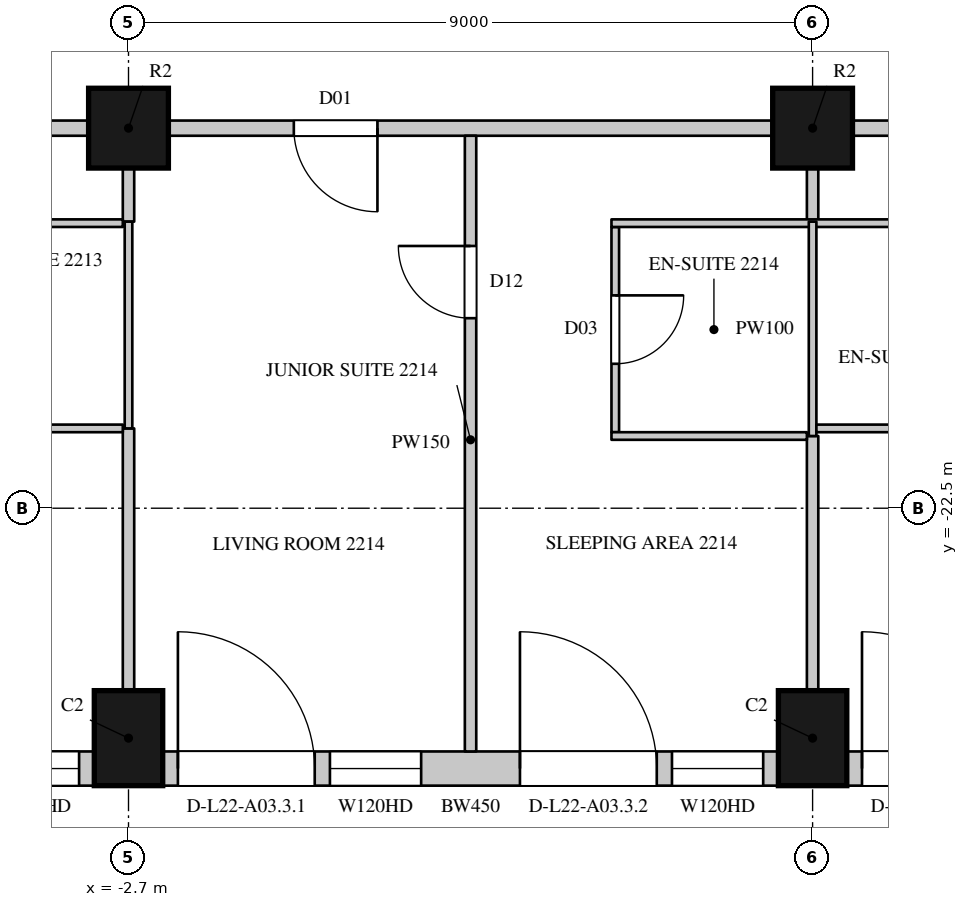
"""IFC4 building model, lengths in metres.
Left out: names, types, materials, properties, quantities, classifications, styles, units other than length and angle.
Written with IfcOpenShell. Run it as: python <this file> out.ifc"""

import sys

from ifc_helpers import new_model, si_unit, direction, frame, frame_2d, origin, origin_2d, place, context, subcontext, project, spatial, rectangle, circle, extrude, element, fill, save


model = new_model("IFC4")
c1 = context("Model", 3, precision=1e-05, world=origin(), true_north=direction((0.0, 1.0)))
c2 = subcontext(c1, "Body", "Model", "MODEL_VIEW")
j1 = project(units=[si_unit("LENGTHUNIT", "METRE"), si_unit("PLANEANGLEUNIT", "RADIAN")], contexts=[c1])
p1 = place(None, origin())
s1 = spatial("IfcSite", under=j1, at=p1, CompositionType="ELEMENT")
p2 = place(p1, origin())
s2 = spatial("IfcBuilding", under=s1, at=p2, CompositionType="ELEMENT")
p3 = place(p2, frame((0.0, 0.0, 109.5)))
s3 = spatial("IfcBuildingStorey", under=s2, at=p3, CompositionType="ELEMENT", Elevation=109.5)
for number, where, z_axis, x_axis in (
    (1, (-2.7, -25.525, 0.0), (0.0, 0.0, 1.0), (1.0, 0.0, 0.0)),
    (2, (6.3, -25.525, 0.0), (0.0, 0.0, 1.0), (1.0, 0.0, 0.0)),
):
    element("IfcColumn", number, at=place(p3, frame(where, z_axis=z_axis, x_axis=x_axis)), inside=s3, PredefinedType="COLUMN", context=c2, shape_type="SweptSolid", body=[
        extrude(rectangle(XDim=0.9, YDim=1.25, at=origin_2d()), origin(), (0.0, 0.0, 1.0), 3.6),
    ])
for number, where, z_axis, x_axis in (
    (3, (-2.7, -17.5, 0.0), (0.0, 0.0, 1.0), (1.0, 0.0, 0.0)),
    (4, (6.3, -17.5, 0.0), (0.0, 0.0, 1.0), (1.0, 0.0, 0.0)),
):
    element("IfcColumn", number, at=place(p3, frame(where, z_axis=z_axis, x_axis=x_axis)), inside=s3, PredefinedType="COLUMN", context=c2, shape_type="SweptSolid", body=[
        extrude(circle(Radius=0.525, at=origin_2d()), origin(), (0.0, 0.0, 1.0), 3.6),
    ])
p4 = place(p3, frame((-11.25, -25.925, 0.0), z_axis=(0.0, 0.0, 1.0), x_axis=(1.0, 0.0, 0.0)))
e5 = element("IfcWall", 5, at=p4, inside=s3, PredefinedType="SOLIDWALL", context=c2, shape_type="SweptSolid", body=[
    extrude(rectangle(XDim=8.1, YDim=0.45, at=frame_2d((4.05, 0.0))), origin(), (0.0, 0.0, 1.0), 3.3),
])
p5 = place(p4, frame((0.2, 0.0, 0.0)))
e6 = element("IfcOpeningElement", 6, at=p5, cuts=e5, PredefinedType="OPENING", context=c2, shape_type="SweptSolid", body=[
    extrude(rectangle(XDim=1.8, YDim=2.4, at=frame_2d((0.9, 1.2))), frame((0.0, 0.235, 0.0), z_axis=(0.0, -1.0, 0.0), x_axis=(1.0, 0.0, 0.0)), (0.0, 0.0, 1.0), 0.47),
])
p6 = place(p4, frame((2.2, 0.0, 1.05)))
e7 = element("IfcOpeningElement", 7, at=p6, cuts=e5, PredefinedType="OPENING", context=c2, shape_type="SweptSolid", body=[
    extrude(rectangle(XDim=1.2, YDim=2.0, at=frame_2d((0.6, 1.0))), frame((0.0, 0.235, 0.0), z_axis=(0.0, -1.0, 0.0), x_axis=(1.0, 0.0, 0.0)), (0.0, 0.0, 1.0), 0.47),
])
p7 = place(p4, frame((4.7, 0.0, 0.0)))
e8 = element("IfcOpeningElement", 8, at=p7, cuts=e5, PredefinedType="OPENING", context=c2, shape_type="SweptSolid", body=[
    extrude(rectangle(XDim=1.8, YDim=2.4, at=frame_2d((0.9, 1.2))), frame((0.0, 0.235, 0.0), z_axis=(0.0, -1.0, 0.0), x_axis=(1.0, 0.0, 0.0)), (0.0, 0.0, 1.0), 0.47),
])
p8 = place(p4, frame((6.7, 0.0, 1.05)))
e9 = element("IfcOpeningElement", 9, at=p8, cuts=e5, PredefinedType="OPENING", context=c2, shape_type="SweptSolid", body=[
    extrude(rectangle(XDim=1.2, YDim=2.0, at=frame_2d((0.6, 1.0))), frame((0.0, 0.235, 0.0), z_axis=(0.0, -1.0, 0.0), x_axis=(1.0, 0.0, 0.0)), (0.0, 0.0, 1.0), 0.47),
])
p9 = place(p3, frame((-2.25, -25.925, 0.0), z_axis=(0.0, 0.0, 1.0), x_axis=(1.0, 0.0, 0.0)))
e10 = element("IfcWall", 10, at=p9, inside=s3, PredefinedType="SOLIDWALL", context=c2, shape_type="SweptSolid", body=[
    extrude(rectangle(XDim=8.1, YDim=0.45, at=frame_2d((4.05, 0.0))), origin(), (0.0, 0.0, 1.0), 3.3),
])
p10 = place(p9, frame((0.2, 0.0, 0.0)))
e11 = element("IfcOpeningElement", 11, at=p10, cuts=e10, PredefinedType="OPENING", context=c2, shape_type="SweptSolid", body=[
    extrude(rectangle(XDim=1.8, YDim=2.4, at=frame_2d((0.9, 1.2))), frame((0.0, 0.235, 0.0), z_axis=(0.0, -1.0, 0.0), x_axis=(1.0, 0.0, 0.0)), (0.0, 0.0, 1.0), 0.47),
])
p11 = place(p9, frame((2.2, 0.0, 1.05)))
e12 = element("IfcOpeningElement", 12, at=p11, cuts=e10, PredefinedType="OPENING", context=c2, shape_type="SweptSolid", body=[
    extrude(rectangle(XDim=1.2, YDim=2.0, at=frame_2d((0.6, 1.0))), frame((0.0, 0.235, 0.0), z_axis=(0.0, -1.0, 0.0), x_axis=(1.0, 0.0, 0.0)), (0.0, 0.0, 1.0), 0.47),
])
p12 = place(p9, frame((4.7, 0.0, 0.0)))
e13 = element("IfcOpeningElement", 13, at=p12, cuts=e10, PredefinedType="OPENING", context=c2, shape_type="SweptSolid", body=[
    extrude(rectangle(XDim=1.8, YDim=2.4, at=frame_2d((0.9, 1.2))), frame((0.0, 0.235, 0.0), z_axis=(0.0, -1.0, 0.0), x_axis=(1.0, 0.0, 0.0)), (0.0, 0.0, 1.0), 0.47),
])
p13 = place(p9, frame((6.7, 0.0, 1.05)))
e14 = element("IfcOpeningElement", 14, at=p13, cuts=e10, PredefinedType="OPENING", context=c2, shape_type="SweptSolid", body=[
    extrude(rectangle(XDim=1.2, YDim=2.0, at=frame_2d((0.6, 1.0))), frame((0.0, 0.235, 0.0), z_axis=(0.0, -1.0, 0.0), x_axis=(1.0, 0.0, 0.0)), (0.0, 0.0, 1.0), 0.47),
])
p14 = place(p3, frame((6.75, -25.925, 0.0), z_axis=(0.0, 0.0, 1.0), x_axis=(1.0, 0.0, 0.0)))
e15 = element("IfcWall", 15, at=p14, inside=s3, PredefinedType="SOLIDWALL", context=c2, shape_type="SweptSolid", body=[
    extrude(rectangle(XDim=8.1, YDim=0.45, at=frame_2d((4.05, 0.0))), origin(), (0.0, 0.0, 1.0), 3.3),
])
p15 = place(p14, frame((0.2, 0.0, 0.0)))
e16 = element("IfcOpeningElement", 16, at=p15, cuts=e15, PredefinedType="OPENING", context=c2, shape_type="SweptSolid", body=[
    extrude(rectangle(XDim=1.8, YDim=2.4, at=frame_2d((0.9, 1.2))), frame((0.0, 0.235, 0.0), z_axis=(0.0, -1.0, 0.0), x_axis=(1.0, 0.0, 0.0)), (0.0, 0.0, 1.0), 0.47),
])
p16 = place(p14, frame((2.2, 0.0, 1.05)))
e17 = element("IfcOpeningElement", 17, at=p16, cuts=e15, PredefinedType="OPENING", context=c2, shape_type="SweptSolid", body=[
    extrude(rectangle(XDim=1.2, YDim=2.0, at=frame_2d((0.6, 1.0))), frame((0.0, 0.235, 0.0), z_axis=(0.0, -1.0, 0.0), x_axis=(1.0, 0.0, 0.0)), (0.0, 0.0, 1.0), 0.47),
])
p17 = place(p14, frame((5.4, 0.0, 0.0)))
e18 = element("IfcOpeningElement", 18, at=p17, cuts=e15, PredefinedType="OPENING", context=c2, shape_type="SweptSolid", body=[
    extrude(rectangle(XDim=1.8, YDim=2.4, at=frame_2d((0.9, 1.2))), frame((0.0, 0.235, 0.0), z_axis=(0.0, -1.0, 0.0), x_axis=(1.0, 0.0, 0.0)), (0.0, 0.0, 1.0), 0.47),
])
p18 = place(p3, frame((-11.175, -17.5, 0.0), z_axis=(0.0, 0.0, 1.0), x_axis=(1.0, 0.0, 0.0)))
e19 = element("IfcWall", 19, at=p18, inside=s3, PredefinedType="PARTITIONING", context=c2, shape_type="SweptSolid", body=[
    extrude(rectangle(XDim=7.95, YDim=0.2, at=frame_2d((3.975, 0.0))), origin(), (0.0, 0.0, 1.0), 2.75),
])
p19 = place(p18, frame((4.55, 0.0, 0.0)))
e20 = element("IfcOpeningElement", 20, at=p19, cuts=e19, PredefinedType="OPENING", context=c2, shape_type="SweptSolid", body=[
    extrude(rectangle(XDim=0.95, YDim=2.2, at=frame_2d((0.475, 1.1))), frame((0.0, 0.11, 0.0), z_axis=(0.0, -1.0, 0.0), x_axis=(1.0, 0.0, 0.0)), (0.0, 0.0, 1.0), 0.22),
])
p20 = place(p3, frame((-2.175, -17.5, 0.0), z_axis=(0.0, 0.0, 1.0), x_axis=(1.0, 0.0, 0.0)))
e21 = element("IfcWall", 21, at=p20, inside=s3, PredefinedType="PARTITIONING", context=c2, shape_type="SweptSolid", body=[
    extrude(rectangle(XDim=7.95, YDim=0.2, at=frame_2d((3.975, 0.0))), origin(), (0.0, 0.0, 1.0), 2.75),
])
p21 = place(p20, frame((1.65, 0.0, 0.0)))
e22 = element("IfcOpeningElement", 22, at=p21, cuts=e21, PredefinedType="OPENING", context=c2, shape_type="SweptSolid", body=[
    extrude(rectangle(XDim=1.1, YDim=2.4, at=frame_2d((0.55, 1.2))), frame((0.0, 0.11, 0.0), z_axis=(0.0, -1.0, 0.0), x_axis=(1.0, 0.0, 0.0)), (0.0, 0.0, 1.0), 0.22),
])
p22 = place(p3, frame((6.825, -17.5, 0.0), z_axis=(0.0, 0.0, 1.0), x_axis=(1.0, 0.0, 0.0)))
e23 = element("IfcWall", 23, at=p22, inside=s3, PredefinedType="PARTITIONING", context=c2, shape_type="SweptSolid", body=[
    extrude(rectangle(XDim=7.95, YDim=0.2, at=frame_2d((3.975, 0.0))), origin(), (0.0, 0.0, 1.0), 2.75),
])
p23 = place(p22, frame((2.45, 0.0, 0.0)))
e24 = element("IfcOpeningElement", 24, at=p23, cuts=e23, PredefinedType="OPENING", context=c2, shape_type="SweptSolid", body=[
    extrude(rectangle(XDim=0.95, YDim=2.2, at=frame_2d((0.475, 1.1))), frame((0.0, 0.11, 0.0), z_axis=(0.0, -1.0, 0.0), x_axis=(1.0, 0.0, 0.0)), (0.0, 0.0, 1.0), 0.22),
])
p24 = place(p22, frame((4.95, 0.0, 0.0)))
e25 = element("IfcOpeningElement", 25, at=p24, cuts=e23, PredefinedType="OPENING", context=c2, shape_type="SweptSolid", body=[
    extrude(rectangle(XDim=0.95, YDim=2.2, at=frame_2d((0.475, 1.1))), frame((0.0, 0.11, 0.0), z_axis=(0.0, -1.0, 0.0), x_axis=(1.0, 0.0, 0.0)), (0.0, 0.0, 1.0), 0.22),
])
p25 = place(p3, frame((-2.7, -24.9, 0.0), z_axis=(0.0, 0.0, 1.0), x_axis=(0.0, 1.0, 0.0)))
e26 = element("IfcWall", 26, at=p25, inside=s3, PredefinedType="PARTITIONING", context=c2, shape_type="SweptSolid", body=[
    extrude(rectangle(XDim=3.45, YDim=0.15, at=frame_2d((1.725, 0.0))), origin(), (0.0, 0.0, 1.0), 2.75),
])
p26 = place(p3, frame((-2.7, -18.73, 0.0), z_axis=(0.0, 0.0, 1.0), x_axis=(0.0, 1.0, 0.0)))
e27 = element("IfcWall", 27, at=p26, inside=s3, PredefinedType="PARTITIONING", context=c2, shape_type="SweptSolid", body=[
    extrude(rectangle(XDim=0.705, YDim=0.15, at=frame_2d((0.353, 0.0))), origin(), (0.0, 0.0, 1.0), 2.75),
])
p27 = place(p3, frame((1.8, -25.7, 0.0), z_axis=(0.0, 0.0, 1.0), x_axis=(0.0, 1.0, 0.0)))
e28 = element("IfcWall", 28, at=p27, inside=s3, PredefinedType="PARTITIONING", context=c2, shape_type="SweptSolid", body=[
    extrude(rectangle(XDim=8.1, YDim=0.15, at=frame_2d((4.05, 0.0))), origin(), (0.0, 0.0, 1.0), 2.65),
])
p28 = place(p27, frame((5.7, 0.0, 0.0)))
e29 = element("IfcOpeningElement", 29, at=p28, cuts=e28, PredefinedType="OPENING", context=c2, shape_type="SweptSolid", body=[
    extrude(rectangle(XDim=0.95, YDim=2.2, at=frame_2d((0.475, 1.1))), frame((0.0, 0.085, 0.0), z_axis=(0.0, -1.0, 0.0), x_axis=(1.0, 0.0, 0.0)), (0.0, 0.0, 1.0), 0.17),
])
p29 = place(p3, frame((6.3, -24.9, 0.0), z_axis=(0.0, 0.0, 1.0), x_axis=(0.0, 1.0, 0.0)))
e30 = element("IfcWall", 30, at=p29, inside=s3, PredefinedType="PARTITIONING", context=c2, shape_type="SweptSolid", body=[
    extrude(rectangle(XDim=3.35, YDim=0.15, at=frame_2d((1.675, 0.0))), origin(), (0.0, 0.0, 1.0), 2.75),
])
p30 = place(p3, frame((6.3, -18.73, 0.0), z_axis=(0.0, 0.0, 1.0), x_axis=(0.0, 1.0, 0.0)))
e31 = element("IfcWall", 31, at=p30, inside=s3, PredefinedType="PARTITIONING", context=c2, shape_type="SweptSolid", body=[
    extrude(rectangle(XDim=0.705, YDim=0.15, at=frame_2d((0.353, 0.0))), origin(), (0.0, 0.0, 1.0), 2.75),
])
for number, where, z_axis, x_axis in (
    (32, (-5.146, -21.45, 0.0), (0.0, 0.0, 1.0), (1.0, 0.0, 0.0)),
    (33, (-5.146, -18.75, 0.0), (0.0, 0.0, 1.0), (1.0, 0.0, 0.0)),
):
    element("IfcWall", number, at=place(p3, frame(where, z_axis=z_axis, x_axis=x_axis)), inside=s3, PredefinedType="PARTITIONING", context=c2, shape_type="SweptSolid", body=[
        extrude(rectangle(XDim=2.371, YDim=0.1, at=frame_2d((1.186, 0.0))), origin(), (0.0, 0.0, 1.0), 3.3),
    ])
p31 = place(p3, frame((-2.7, -21.45, 0.0), z_axis=(0.0, 0.0, 1.0), x_axis=(0.0, 1.0, 0.0)))
e34 = element("IfcWall", 34, at=p31, inside=s3, PredefinedType="PARTITIONING", context=c2, shape_type="SweptSolid", body=[
    extrude(rectangle(XDim=2.72, YDim=0.1, at=frame_2d((1.36, 0.0))), origin(), (0.0, 0.0, 1.0), 2.75),
])
p32 = place(p3, frame((3.704, -21.5, 0.0), z_axis=(0.0, 0.0, 1.0), x_axis=(0.0, 1.0, 0.0)))
e35 = element("IfcWall", 35, at=p32, inside=s3, PredefinedType="PARTITIONING", context=c2, shape_type="SweptSolid", body=[
    extrude(rectangle(XDim=2.7, YDim=0.1, at=frame_2d((1.35, 0.0))), origin(), (0.0, 0.0, 1.0), 3.3),
])
p33 = place(p32, frame((0.9, 0.0, 0.0)))
e36 = element("IfcOpeningElement", 36, at=p33, cuts=e35, PredefinedType="OPENING", context=c2, shape_type="SweptSolid", body=[
    extrude(rectangle(XDim=0.9, YDim=2.2, at=frame_2d((0.45, 1.1))), frame((0.0, 0.06, 0.0), z_axis=(0.0, -1.0, 0.0), x_axis=(1.0, 0.0, 0.0)), (0.0, 0.0, 1.0), 0.12),
])
p34 = place(p3, frame((3.654, -21.55, 0.0), z_axis=(0.0, 0.0, 1.0), x_axis=(1.0, 0.0, 0.0)))
e37 = element("IfcWall", 37, at=p34, inside=s3, PredefinedType="PARTITIONING", context=c2, shape_type="SweptSolid", body=[
    extrude(rectangle(XDim=2.571, YDim=0.1, at=frame_2d((1.286, 0.0))), origin(), (0.0, 0.0, 1.0), 3.3),
])
p35 = place(p3, frame((3.654, -18.75, 0.0), z_axis=(0.0, 0.0, 1.0), x_axis=(1.0, 0.0, 0.0)))
e38 = element("IfcWall", 38, at=p35, inside=s3, PredefinedType="PARTITIONING", context=c2, shape_type="SweptSolid", body=[
    extrude(rectangle(XDim=5.092, YDim=0.1, at=frame_2d((2.546, 0.0))), origin(), (0.0, 0.0, 1.0), 3.3),
])
p36 = place(p35, frame((3.95, 0.0, 0.0)))
e39 = element("IfcOpeningElement", 39, at=p36, cuts=e38, PredefinedType="OPENING", context=c2, shape_type="SweptSolid", body=[
    extrude(rectangle(XDim=0.9, YDim=2.2, at=frame_2d((0.45, 1.1))), frame((0.0, 0.06, 0.0), z_axis=(0.0, -1.0, 0.0), x_axis=(1.0, 0.0, 0.0)), (0.0, 0.0, 1.0), 0.12),
])
p37 = place(p3, frame((6.3, -21.55, 0.0), z_axis=(0.0, 0.0, 1.0), x_axis=(0.0, 1.0, 0.0)))
e40 = element("IfcWall", 40, at=p37, inside=s3, PredefinedType="PARTITIONING", context=c2, shape_type="SweptSolid", body=[
    extrude(rectangle(XDim=2.82, YDim=0.1, at=frame_2d((1.41, 0.0))), origin(), (0.0, 0.0, 1.0), 2.75),
])
p38 = place(p3, frame((6.35, -21.45, 0.0), z_axis=(0.0, 0.0, 1.0), x_axis=(1.0, 0.0, 0.0)))
e41 = element("IfcWall", 41, at=p38, inside=s3, PredefinedType="PARTITIONING", context=c2, shape_type="SweptSolid", body=[
    extrude(rectangle(XDim=2.396, YDim=0.1, at=frame_2d((1.198, 0.0))), origin(), (0.0, 0.0, 1.0), 3.3),
])
p39 = place(p8, origin())
e42 = element("IfcWindow", 42, at=p39, inside=s3, PartitioningType="SINGLE_PANEL", PredefinedType="WINDOW", context=c2, shape_type="SweptSolid", body=[
    extrude(rectangle(XDim=1.2, YDim=2.0, at=frame_2d((0.6, 1.0))), frame((0.0, 0.135, 0.0), z_axis=(0.0, -1.0, 0.0), x_axis=(1.0, 0.0, 0.0)), (0.0, 0.0, 1.0), 0.06),
])
fill(e9, e42)
p40 = place(p10, origin())
e43 = element("IfcDoor", 43, at=p40, inside=s3, OperationType="SLIDING_TO_LEFT", PredefinedType="DOOR", context=c2, shape_type="SweptSolid", body=[
    extrude(rectangle(XDim=1.8, YDim=2.4, at=frame_2d((0.9, 1.2))), frame((0.0, 0.13, 0.0), z_axis=(0.0, -1.0, 0.0), x_axis=(1.0, 0.0, 0.0)), (0.0, 0.0, 1.0), 0.05),
])
fill(e11, e43)
p41 = place(p11, origin())
e44 = element("IfcWindow", 44, at=p41, inside=s3, PartitioningType="SINGLE_PANEL", PredefinedType="WINDOW", context=c2, shape_type="SweptSolid", body=[
    extrude(rectangle(XDim=1.2, YDim=2.0, at=frame_2d((0.6, 1.0))), frame((0.0, 0.135, 0.0), z_axis=(0.0, -1.0, 0.0), x_axis=(1.0, 0.0, 0.0)), (0.0, 0.0, 1.0), 0.06),
])
fill(e12, e44)
p42 = place(p12, origin())
e45 = element("IfcDoor", 45, at=p42, inside=s3, OperationType="SLIDING_TO_LEFT", PredefinedType="DOOR", context=c2, shape_type="SweptSolid", body=[
    extrude(rectangle(XDim=1.8, YDim=2.4, at=frame_2d((0.9, 1.2))), frame((0.0, 0.13, 0.0), z_axis=(0.0, -1.0, 0.0), x_axis=(1.0, 0.0, 0.0)), (0.0, 0.0, 1.0), 0.05),
])
fill(e13, e45)
p43 = place(p13, origin())
e46 = element("IfcWindow", 46, at=p43, inside=s3, PartitioningType="SINGLE_PANEL", PredefinedType="WINDOW", context=c2, shape_type="SweptSolid", body=[
    extrude(rectangle(XDim=1.2, YDim=2.0, at=frame_2d((0.6, 1.0))), frame((0.0, 0.135, 0.0), z_axis=(0.0, -1.0, 0.0), x_axis=(1.0, 0.0, 0.0)), (0.0, 0.0, 1.0), 0.06),
])
fill(e14, e46)
p44 = place(p15, origin())
e47 = element("IfcDoor", 47, at=p44, inside=s3, OperationType="SLIDING_TO_LEFT", PredefinedType="DOOR", context=c2, shape_type="SweptSolid", body=[
    extrude(rectangle(XDim=1.8, YDim=2.4, at=frame_2d((0.9, 1.2))), frame((0.0, 0.13, 0.0), z_axis=(0.0, -1.0, 0.0), x_axis=(1.0, 0.0, 0.0)), (0.0, 0.0, 1.0), 0.05),
])
fill(e16, e47)
p45 = place(p21, origin())
e48 = element("IfcDoor", 48, at=p45, inside=s3, OperationType="SINGLE_SWING_LEFT", PredefinedType="DOOR", context=c2, shape_type="SweptSolid", body=[
    extrude(rectangle(XDim=1.1, YDim=2.4, at=frame_2d((0.55, 1.2))), frame((0.0, 0.025, 0.0), z_axis=(0.0, -1.0, 0.0), x_axis=(1.0, 0.0, 0.0)), (0.0, 0.0, 1.0), 0.05),
])
fill(e22, e48)
p46 = place(p28, origin())
e49 = element("IfcDoor", 49, at=p46, inside=s3, OperationType="SINGLE_SWING_RIGHT", PredefinedType="DOOR", context=c2, shape_type="SweptSolid", body=[
    extrude(rectangle(XDim=0.95, YDim=2.2, at=frame_2d((0.475, 1.1))), frame((0.0, 0.025, 0.0), z_axis=(0.0, -1.0, 0.0), x_axis=(1.0, 0.0, 0.0)), (0.0, 0.0, 1.0), 0.05),
])
fill(e29, e49)
p47 = place(p33, origin())
e50 = element("IfcDoor", 50, at=p47, inside=s3, OperationType="SINGLE_SWING_LEFT", PredefinedType="DOOR", context=c2, shape_type="SweptSolid", body=[
    extrude(rectangle(XDim=0.9, YDim=2.2, at=frame_2d((0.45, 1.1))), frame((0.0, 0.025, 0.0), z_axis=(0.0, -1.0, 0.0), x_axis=(1.0, 0.0, 0.0)), (0.0, 0.0, 1.0), 0.05),
])
fill(e36, e50)
save(model, sys.argv[1])
